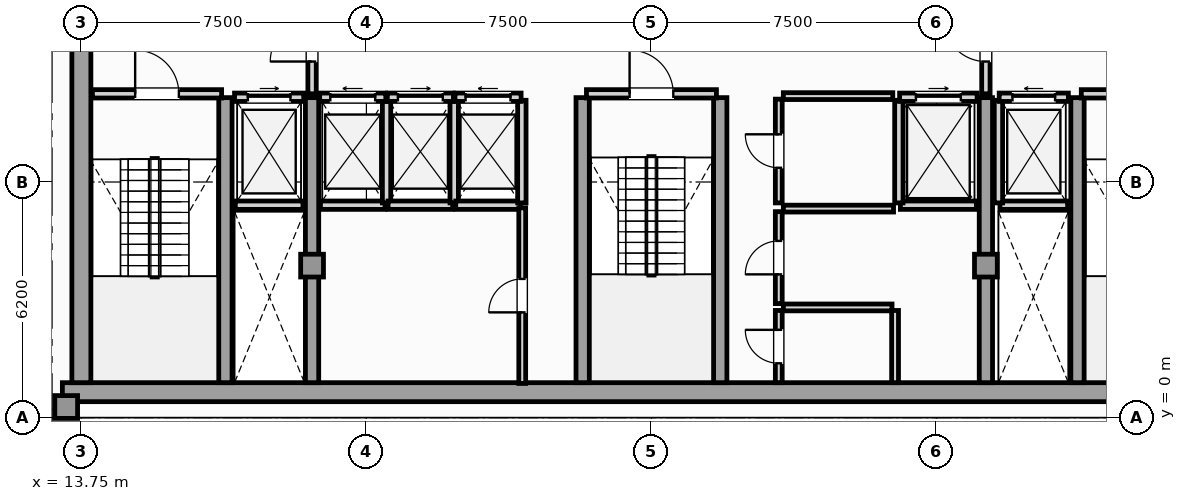
"""IFC4 building model, lengths in metres.
Left out: names, types, materials, properties, quantities, classifications, styles, units other than length and angle.
Written with IfcOpenShell. Run it as: python <this file> out.ifc"""

import sys

from ifc_helpers import new_model, si_unit, direction, frame, frame_2d, origin, origin_2d, place, context, subcontext, project, spatial, rectangle, extrude, element, fill, save


model = new_model("IFC4")
c1 = context("Model", 3, precision=1e-05, world=origin(), true_north=direction((0.0, 1.0)))
c2 = subcontext(c1, "Body", "Model", "MODEL_VIEW")
j1 = project(units=[si_unit("LENGTHUNIT", "METRE"), si_unit("PLANEANGLEUNIT", "RADIAN")], contexts=[c1])
p1 = place(None, origin())
s1 = spatial("IfcSite", under=j1, at=p1, CompositionType="ELEMENT")
p2 = place(p1, origin())
s2 = spatial("IfcBuilding", under=s1, at=p2, CompositionType="ELEMENT")
p3 = place(p2, frame((0.0, 0.0, 349.05)))
s3 = spatial("IfcBuildingStorey", under=s2, at=p3, CompositionType="ELEMENT", Elevation=349.05)
p4 = place(p3, frame((13.25, 0.67, 0.0), z_axis=(0.0, 0.0, 1.0), x_axis=(1.0, 0.0, 0.0)))
e1 = element("IfcWall", 1, at=p4, inside=s3, PredefinedType="SHEAR", context=c2, shape_type="SweptSolid", body=[
    extrude(rectangle(XDim=31.0, YDim=0.5, at=frame_2d((15.5, 0.0))), origin(), (0.0, 0.0, 1.0), 4.14),
])
p5 = place(p3, frame((13.75, 0.92, 0.0), z_axis=(0.0, 0.0, 1.0), x_axis=(0.0, 1.0, 0.0)))
e2 = element("IfcWall", 2, at=p5, inside=s3, PredefinedType="SHEAR", context=c2, shape_type="SweptSolid", body=[
    extrude(rectangle(XDim=10.53, YDim=0.5, at=frame_2d((5.265, 0.0))), origin(), (0.0, 0.0, 1.0), 4.14),
])
for number, where, z_axis, x_axis in (
    (3, (17.54, 0.92, 0.0), (0.0, 0.0, 1.0), (0.0, 1.0, 0.0)),
    (4, (19.82, 0.92, 0.0), (0.0, 0.0, 1.0), (0.0, 1.0, 0.0)),
    (5, (26.94, 0.92, 0.0), (0.0, 0.0, 1.0), (0.0, 1.0, 0.0)),
    (6, (30.56, 0.92, 0.0), (0.0, 0.0, 1.0), (0.0, 1.0, 0.0)),
    (7, (37.55, 0.92, 0.0), (0.0, 0.0, 1.0), (0.0, 1.0, 0.0)),
    (8, (39.96, 0.92, 0.0), (0.0, 0.0, 1.0), (0.0, 1.0, 0.0)),
):
    element("IfcWall", number, at=place(p3, frame(where, z_axis=z_axis, x_axis=x_axis)), inside=s3, PredefinedType="SHEAR", context=c2, shape_type="SweptSolid", body=[
        extrude(rectangle(XDim=7.5, YDim=0.35, at=frame_2d((3.75, 0.0))), origin(), (0.0, 0.0, 1.0), 4.14),
    ])
for number, where, z_axis, x_axis in (
    (9, (13.35, 0.28, 0.0), (0.0, 0.0, 1.0), (1.0, 0.0, 0.0)),
    (10, (19.82, 4.0, 0.0), (0.0, 0.0, 1.0), (1.0, 0.0, 0.0)),
    (11, (37.55, 4.0, 0.0), (0.0, 0.0, 1.0), (1.0, 0.0, 0.0)),
):
    element("IfcColumn", number, at=place(p3, frame(where, z_axis=z_axis, x_axis=x_axis)), inside=s3, PredefinedType="COLUMN", context=c2, shape_type="SweptSolid", body=[
        extrude(rectangle(XDim=0.6, YDim=0.6, at=origin_2d()), origin(), (0.0, 0.0, 1.0), 4.4),
    ])
p6 = place(p3, frame((17.8, 5.59, 0.0), z_axis=(0.0, 0.0, 1.0), x_axis=(1.0, 0.0, 0.0)))
e12 = element("IfcWall", 12, at=p6, inside=s3, PredefinedType="SOLIDWALL", context=c2, shape_type="SweptSolid", body=[
    extrude(rectangle(XDim=1.78, YDim=0.22, at=frame_2d((0.89, 0.0))), origin(), (0.0, 0.0, 1.0), 4.14),
])
p7 = place(p3, frame((17.78, 8.43, 0.0), z_axis=(0.0, 0.0, 1.0), x_axis=(1.0, 0.0, 0.0)))
e13 = element("IfcWall", 13, at=p7, inside=s3, PredefinedType="SOLIDWALL", context=c2, shape_type="SweptSolid", body=[
    extrude(rectangle(XDim=1.82, YDim=0.22, at=frame_2d((0.91, 0.0))), origin(), (0.0, 0.0, 1.0), 4.14),
])
p8 = place(p7, frame((0.35, 0.0, 0.0)))
e14 = element("IfcOpeningElement", 14, at=p8, cuts=e13, PredefinedType="OPENING", context=c2, shape_type="SweptSolid", body=[
    extrude(rectangle(XDim=1.12, YDim=2.25, at=frame_2d((0.56, 1.125))), frame((0.0, 0.12, 0.0), z_axis=(0.0, -1.0, 0.0), x_axis=(1.0, 0.0, 0.0)), (0.0, 0.0, 1.0), 0.24),
])
p9 = place(p3, frame((37.92, 5.59, 0.0), z_axis=(0.0, 0.0, 1.0), x_axis=(1.0, 0.0, 0.0)))
e15 = element("IfcWall", 15, at=p9, inside=s3, PredefinedType="SOLIDWALL", context=c2, shape_type="SweptSolid", body=[
    extrude(rectangle(XDim=1.78, YDim=0.22, at=frame_2d((0.89, 0.0))), origin(), (0.0, 0.0, 1.0), 4.14),
])
p10 = place(p3, frame((37.88, 5.65, 0.0), z_axis=(0.0, 0.0, 1.0), x_axis=(0.0, 1.0, 0.0)))
e16 = element("IfcWall", 16, at=p10, inside=s3, PredefinedType="SOLIDWALL", context=c2, shape_type="SweptSolid", body=[
    extrude(rectangle(XDim=2.7, YDim=0.22, at=frame_2d((1.35, 0.0))), origin(), (0.0, 0.0, 1.0), 4.14),
])
p11 = place(p3, frame((37.9, 8.43, 0.0), z_axis=(0.0, 0.0, 1.0), x_axis=(1.0, 0.0, 0.0)))
e17 = element("IfcWall", 17, at=p11, inside=s3, PredefinedType="SOLIDWALL", context=c2, shape_type="SweptSolid", body=[
    extrude(rectangle(XDim=1.82, YDim=0.22, at=frame_2d((0.91, 0.0))), origin(), (0.0, 0.0, 1.0), 4.14),
])
p12 = place(p11, frame((0.35, 0.0, 0.0)))
e18 = element("IfcOpeningElement", 18, at=p12, cuts=e17, PredefinedType="OPENING", context=c2, shape_type="SweptSolid", body=[
    extrude(rectangle(XDim=1.12, YDim=2.25, at=frame_2d((0.56, 1.125))), frame((0.0, 0.12, 0.0), z_axis=(0.0, -1.0, 0.0), x_axis=(1.0, 0.0, 0.0)), (0.0, 0.0, 1.0), 0.24),
])
p13 = place(p3, frame((35.3, 5.59, 0.0), z_axis=(0.0, 0.0, 1.0), x_axis=(1.0, 0.0, 0.0)))
e19 = element("IfcWall", 19, at=p13, inside=s3, PredefinedType="SOLIDWALL", context=c2, shape_type="SweptSolid", body=[
    extrude(rectangle(XDim=2.0, YDim=0.22, at=frame_2d((1.0, 0.0))), origin(), (0.0, 0.0, 1.0), 4.14),
])
p14 = place(p3, frame((35.26, 5.65, 0.0), z_axis=(0.0, 0.0, 1.0), x_axis=(0.0, 1.0, 0.0)))
e20 = element("IfcWall", 20, at=p14, inside=s3, PredefinedType="SOLIDWALL", context=c2, shape_type="SweptSolid", body=[
    extrude(rectangle(XDim=2.7, YDim=0.22, at=frame_2d((1.35, 0.0))), origin(), (0.0, 0.0, 1.0), 4.14),
])
p15 = place(p3, frame((35.28, 8.43, 0.0), z_axis=(0.0, 0.0, 1.0), x_axis=(1.0, 0.0, 0.0)))
e21 = element("IfcWall", 21, at=p15, inside=s3, PredefinedType="SOLIDWALL", context=c2, shape_type="SweptSolid", body=[
    extrude(rectangle(XDim=2.04, YDim=0.22, at=frame_2d((1.02, 0.0))), origin(), (0.0, 0.0, 1.0), 4.14),
])
p16 = place(p15, frame((0.43, 0.0, 0.0)))
e22 = element("IfcOpeningElement", 22, at=p16, cuts=e21, PredefinedType="OPENING", context=c2, shape_type="SweptSolid", body=[
    extrude(rectangle(XDim=1.18, YDim=2.2, at=frame_2d((0.59, 1.1))), frame((0.0, 0.12, 0.0), z_axis=(0.0, -1.0, 0.0), x_axis=(1.0, 0.0, 0.0)), (0.0, 0.0, 1.0), 0.24),
])
p17 = place(p3, frame((20.04, 5.59, 0.0), z_axis=(0.0, 0.0, 1.0), x_axis=(1.0, 0.0, 0.0)))
e23 = element("IfcWall", 23, at=p17, inside=s3, PredefinedType="SOLIDWALL", context=c2, shape_type="SweptSolid", body=[
    extrude(rectangle(XDim=1.7, YDim=0.22, at=frame_2d((0.85, 0.0))), origin(), (0.0, 0.0, 1.0), 4.14),
])
p18 = place(p3, frame((21.78, 5.65, 0.0), z_axis=(0.0, 0.0, 1.0), x_axis=(0.0, 1.0, 0.0)))
e24 = element("IfcWall", 24, at=p18, inside=s3, PredefinedType="SOLIDWALL", context=c2, shape_type="SweptSolid", body=[
    extrude(rectangle(XDim=2.7, YDim=0.22, at=frame_2d((1.35, 0.0))), origin(), (0.0, 0.0, 1.0), 4.14),
])
p19 = place(p3, frame((20.02, 8.43, 0.0), z_axis=(0.0, 0.0, 1.0), x_axis=(1.0, 0.0, 0.0)))
e25 = element("IfcWall", 25, at=p19, inside=s3, PredefinedType="SOLIDWALL", context=c2, shape_type="SweptSolid", body=[
    extrude(rectangle(XDim=1.74, YDim=0.22, at=frame_2d((0.87, 0.0))), origin(), (0.0, 0.0, 1.0), 4.14),
])
p20 = place(p19, frame((0.28, 0.0, 0.0)))
e26 = element("IfcOpeningElement", 26, at=p20, cuts=e25, PredefinedType="OPENING", context=c2, shape_type="SweptSolid", body=[
    extrude(rectangle(XDim=1.18, YDim=2.2, at=frame_2d((0.59, 1.1))), frame((0.0, 0.12, 0.0), z_axis=(0.0, -1.0, 0.0), x_axis=(1.0, 0.0, 0.0)), (0.0, 0.0, 1.0), 0.24),
])
p21 = place(p3, frame((21.82, 5.59, 0.0), z_axis=(0.0, 0.0, 1.0), x_axis=(1.0, 0.0, 0.0)))
e27 = element("IfcWall", 27, at=p21, inside=s3, PredefinedType="SOLIDWALL", context=c2, shape_type="SweptSolid", body=[
    extrude(rectangle(XDim=1.7, YDim=0.22, at=frame_2d((0.85, 0.0))), origin(), (0.0, 0.0, 1.0), 4.14),
])
p22 = place(p3, frame((23.56, 5.65, 0.0), z_axis=(0.0, 0.0, 1.0), x_axis=(0.0, 1.0, 0.0)))
e28 = element("IfcWall", 28, at=p22, inside=s3, PredefinedType="SOLIDWALL", context=c2, shape_type="SweptSolid", body=[
    extrude(rectangle(XDim=2.7, YDim=0.22, at=frame_2d((1.35, 0.0))), origin(), (0.0, 0.0, 1.0), 4.14),
])
p23 = place(p3, frame((21.8, 8.43, 0.0), z_axis=(0.0, 0.0, 1.0), x_axis=(1.0, 0.0, 0.0)))
e29 = element("IfcWall", 29, at=p23, inside=s3, PredefinedType="SOLIDWALL", context=c2, shape_type="SweptSolid", body=[
    extrude(rectangle(XDim=1.74, YDim=0.22, at=frame_2d((0.87, 0.0))), origin(), (0.0, 0.0, 1.0), 4.14),
])
p24 = place(p23, frame((0.28, 0.0, 0.0)))
e30 = element("IfcOpeningElement", 30, at=p24, cuts=e29, PredefinedType="OPENING", context=c2, shape_type="SweptSolid", body=[
    extrude(rectangle(XDim=1.18, YDim=2.2, at=frame_2d((0.59, 1.1))), frame((0.0, 0.12, 0.0), z_axis=(0.0, -1.0, 0.0), x_axis=(1.0, 0.0, 0.0)), (0.0, 0.0, 1.0), 0.24),
])
p25 = place(p3, frame((23.6, 5.59, 0.0), z_axis=(0.0, 0.0, 1.0), x_axis=(1.0, 0.0, 0.0)))
e31 = element("IfcWall", 31, at=p25, inside=s3, PredefinedType="SOLIDWALL", context=c2, shape_type="SweptSolid", body=[
    extrude(rectangle(XDim=1.7, YDim=0.22, at=frame_2d((0.85, 0.0))), origin(), (0.0, 0.0, 1.0), 4.14),
])
p26 = place(p3, frame((25.34, 5.65, 0.0), z_axis=(0.0, 0.0, 1.0), x_axis=(0.0, 1.0, 0.0)))
e32 = element("IfcWall", 32, at=p26, inside=s3, PredefinedType="SOLIDWALL", context=c2, shape_type="SweptSolid", body=[
    extrude(rectangle(XDim=2.7, YDim=0.22, at=frame_2d((1.35, 0.0))), origin(), (0.0, 0.0, 1.0), 4.14),
])
p27 = place(p3, frame((23.58, 8.43, 0.0), z_axis=(0.0, 0.0, 1.0), x_axis=(1.0, 0.0, 0.0)))
e33 = element("IfcWall", 33, at=p27, inside=s3, PredefinedType="SOLIDWALL", context=c2, shape_type="SweptSolid", body=[
    extrude(rectangle(XDim=1.74, YDim=0.22, at=frame_2d((0.87, 0.0))), origin(), (0.0, 0.0, 1.0), 4.14),
])
p28 = place(p27, frame((0.28, 0.0, 0.0)))
e34 = element("IfcOpeningElement", 34, at=p28, cuts=e33, PredefinedType="OPENING", context=c2, shape_type="SweptSolid", body=[
    extrude(rectangle(XDim=1.18, YDim=2.2, at=frame_2d((0.59, 1.1))), frame((0.0, 0.12, 0.0), z_axis=(0.0, -1.0, 0.0), x_axis=(1.0, 0.0, 0.0)), (0.0, 0.0, 1.0), 0.24),
])
p29 = place(p3, frame((14.04, 8.52, 0.0), z_axis=(0.0, 0.0, 1.0), x_axis=(1.0, 0.0, 0.0)))
e35 = element("IfcWall", 35, at=p29, inside=s3, PredefinedType="SOLIDWALL", context=c2, shape_type="SweptSolid", body=[
    extrude(rectangle(XDim=3.4, YDim=0.22, at=frame_2d((1.7, 0.0))), origin(), (0.0, 0.0, 1.0), 4.14),
])
p30 = place(p29, frame((1.125, 0.0, 0.0)))
e36 = element("IfcOpeningElement", 36, at=p30, cuts=e35, PredefinedType="OPENING", context=c2, shape_type="SweptSolid", body=[
    extrude(rectangle(XDim=1.15, YDim=2.2, at=frame_2d((0.575, 1.1))), frame((0.0, 0.12, 0.0), z_axis=(0.0, -1.0, 0.0), x_axis=(1.0, 0.0, 0.0)), (0.0, 0.0, 1.0), 0.24),
])
p31 = place(p3, frame((40.06, 8.52, 0.0), z_axis=(0.0, 0.0, 1.0), x_axis=(1.0, 0.0, 0.0)))
e37 = element("IfcWall", 37, at=p31, inside=s3, PredefinedType="SOLIDWALL", context=c2, shape_type="SweptSolid", body=[
    extrude(rectangle(XDim=3.4, YDim=0.22, at=frame_2d((1.7, 0.0))), origin(), (0.0, 0.0, 1.0), 4.14),
])
p32 = place(p31, frame((1.125, 0.0, 0.0)))
e38 = element("IfcOpeningElement", 38, at=p32, cuts=e37, PredefinedType="OPENING", context=c2, shape_type="SweptSolid", body=[
    extrude(rectangle(XDim=1.15, YDim=2.2, at=frame_2d((0.575, 1.1))), frame((0.0, 0.12, 0.0), z_axis=(0.0, -1.0, 0.0), x_axis=(1.0, 0.0, 0.0)), (0.0, 0.0, 1.0), 0.24),
])
p33 = place(p3, frame((27.04, 8.52, 0.0), z_axis=(0.0, 0.0, 1.0), x_axis=(1.0, 0.0, 0.0)))
e39 = element("IfcWall", 39, at=p33, inside=s3, PredefinedType="SOLIDWALL", context=c2, shape_type="SweptSolid", body=[
    extrude(rectangle(XDim=3.42, YDim=0.22, at=frame_2d((1.71, 0.0))), origin(), (0.0, 0.0, 1.0), 4.14),
])
p34 = place(p33, frame((1.135, 0.0, 0.0)))
e40 = element("IfcOpeningElement", 40, at=p34, cuts=e39, PredefinedType="OPENING", context=c2, shape_type="SweptSolid", body=[
    extrude(rectangle(XDim=1.15, YDim=2.2, at=frame_2d((0.575, 1.1))), frame((0.0, 0.12, 0.0), z_axis=(0.0, -1.0, 0.0), x_axis=(1.0, 0.0, 0.0)), (0.0, 0.0, 1.0), 0.24),
])
p35 = place(p3, frame((19.82, 8.52, 0.0), z_axis=(0.0, 0.0, 1.0), x_axis=(0.0, 1.0, 0.0)))
e41 = element("IfcWall", 41, at=p35, inside=s3, PredefinedType="SOLIDWALL", context=c2, shape_type="SweptSolid", body=[
    extrude(rectangle(XDim=2.8, YDim=0.22, at=frame_2d((1.4, 0.0))), origin(), (0.0, 0.0, 1.0), 3.595),
])
p36 = place(p35, frame((0.85, 0.0, 0.0)))
e42 = element("IfcOpeningElement", 42, at=p36, cuts=e41, PredefinedType="OPENING", context=c2, shape_type="SweptSolid", body=[
    extrude(rectangle(XDim=1.1, YDim=2.2, at=frame_2d((0.55, 1.1))), frame((0.0, 0.12, 0.0), z_axis=(0.0, -1.0, 0.0), x_axis=(1.0, 0.0, 0.0)), (0.0, 0.0, 1.0), 0.24),
])
p37 = place(p3, frame((37.55, 8.52, 0.0), z_axis=(0.0, 0.0, 1.0), x_axis=(0.0, 1.0, 0.0)))
e43 = element("IfcWall", 43, at=p37, inside=s3, PredefinedType="SOLIDWALL", context=c2, shape_type="SweptSolid", body=[
    extrude(rectangle(XDim=2.8, YDim=0.22, at=frame_2d((1.4, 0.0))), origin(), (0.0, 0.0, 1.0), 3.595),
])
p38 = place(p37, frame((0.85, 0.0, 0.0)))
e44 = element("IfcOpeningElement", 44, at=p38, cuts=e43, PredefinedType="OPENING", context=c2, shape_type="SweptSolid", body=[
    extrude(rectangle(XDim=1.1, YDim=2.2, at=frame_2d((0.55, 1.1))), frame((0.0, 0.12, 0.0), z_axis=(0.0, -1.0, 0.0), x_axis=(1.0, 0.0, 0.0)), (0.0, 0.0, 1.0), 0.24),
])
p39 = place(p3, frame((25.35, 0.9, 0.0), z_axis=(0.0, 0.0, 1.0), x_axis=(0.0, 1.0, 0.0)))
e45 = element("IfcWall", 45, at=p39, inside=s3, PredefinedType="PARTITIONING", context=c2, shape_type="SweptSolid", body=[
    extrude(rectangle(XDim=4.62, YDim=0.18, at=frame_2d((2.31, 0.0))), origin(), (0.0, 0.0, 1.0), 4.14),
])
p40 = place(p39, frame((1.87, 0.0, 0.0)))
e46 = element("IfcOpeningElement", 46, at=p40, cuts=e45, PredefinedType="OPENING", context=c2, shape_type="SweptSolid", body=[
    extrude(rectangle(XDim=0.88, YDim=2.05, at=frame_2d((0.44, 1.025))), frame((0.0, 0.1, 0.0), z_axis=(0.0, -1.0, 0.0), x_axis=(1.0, 0.0, 0.0)), (0.0, 0.0, 1.0), 0.2),
])
p41 = place(p3, frame((32.1, 0.92, 0.0), z_axis=(0.0, 0.0, 1.0), x_axis=(0.0, 1.0, 0.0)))
e47 = element("IfcWall", 47, at=p41, inside=s3, PredefinedType="PARTITIONING", context=c2, shape_type="SweptSolid", body=[
    extrude(rectangle(XDim=1.9, YDim=0.18, at=frame_2d((0.95, 0.0))), origin(), (0.0, 0.0, 1.0), 4.14),
])
p42 = place(p41, frame((0.51, 0.0, 0.0)))
e48 = element("IfcOpeningElement", 48, at=p42, cuts=e47, PredefinedType="OPENING", context=c2, shape_type="SweptSolid", body=[
    extrude(rectangle(XDim=0.88, YDim=2.05, at=frame_2d((0.44, 1.025))), frame((0.0, 0.1, 0.0), z_axis=(0.0, -1.0, 0.0), x_axis=(1.0, 0.0, 0.0)), (0.0, 0.0, 1.0), 0.2),
])
p43 = place(p3, frame((32.22, 2.9, 0.0), z_axis=(0.0, 0.0, 1.0), x_axis=(1.0, 0.0, 0.0)))
e49 = element("IfcWall", 49, at=p43, inside=s3, PredefinedType="PARTITIONING", context=c2, shape_type="SweptSolid", body=[
    extrude(rectangle(XDim=2.86, YDim=0.18, at=frame_2d((1.43, 0.0))), origin(), (0.0, 0.0, 1.0), 4.14),
])
p44 = place(p3, frame((35.16, 0.92, 0.0), z_axis=(0.0, 0.0, 1.0), x_axis=(0.0, 1.0, 0.0)))
e50 = element("IfcWall", 50, at=p44, inside=s3, PredefinedType="PARTITIONING", context=c2, shape_type="SweptSolid", body=[
    extrude(rectangle(XDim=1.9, YDim=0.18, at=frame_2d((0.95, 0.0))), origin(), (0.0, 0.0, 1.0), 4.14),
])
p45 = place(p3, frame((32.1, 3.0, 0.0), z_axis=(0.0, 0.0, 1.0), x_axis=(0.0, 1.0, 0.0)))
e51 = element("IfcWall", 51, at=p45, inside=s3, PredefinedType="PARTITIONING", context=c2, shape_type="SweptSolid", body=[
    extrude(rectangle(XDim=2.42, YDim=0.18, at=frame_2d((1.21, 0.0))), origin(), (0.0, 0.0, 1.0), 4.14),
])
p46 = place(p45, frame((0.77, 0.0, 0.0)))
e52 = element("IfcOpeningElement", 52, at=p46, cuts=e51, PredefinedType="OPENING", context=c2, shape_type="SweptSolid", body=[
    extrude(rectangle(XDim=0.88, YDim=2.05, at=frame_2d((0.44, 1.025))), frame((0.0, 0.1, 0.0), z_axis=(0.0, -1.0, 0.0), x_axis=(1.0, 0.0, 0.0)), (0.0, 0.0, 1.0), 0.2),
])
p47 = place(p3, frame((32.22, 5.5, 0.0), z_axis=(0.0, 0.0, 1.0), x_axis=(1.0, 0.0, 0.0)))
e53 = element("IfcWall", 53, at=p47, inside=s3, PredefinedType="PARTITIONING", context=c2, shape_type="SweptSolid", body=[
    extrude(rectangle(XDim=2.9, YDim=0.18, at=frame_2d((1.45, 0.0))), origin(), (0.0, 0.0, 1.0), 4.14),
])
p48 = place(p3, frame((32.1, 5.65, 0.0), z_axis=(0.0, 0.0, 1.0), x_axis=(0.0, 1.0, 0.0)))
e54 = element("IfcWall", 54, at=p48, inside=s3, PredefinedType="PARTITIONING", context=c2, shape_type="SweptSolid", body=[
    extrude(rectangle(XDim=2.73, YDim=0.18, at=frame_2d((1.365, 0.0))), origin(), (0.0, 0.0, 1.0), 4.14),
])
p49 = place(p48, frame((0.925, 0.0, 0.0)))
e55 = element("IfcOpeningElement", 55, at=p49, cuts=e54, PredefinedType="OPENING", context=c2, shape_type="SweptSolid", body=[
    extrude(rectangle(XDim=0.88, YDim=2.05, at=frame_2d((0.44, 1.025))), frame((0.0, 0.1, 0.0), z_axis=(0.0, -1.0, 0.0), x_axis=(1.0, 0.0, 0.0)), (0.0, 0.0, 1.0), 0.2),
])
p50 = place(p3, frame((32.22, 8.46, 0.0), z_axis=(0.0, 0.0, 1.0), x_axis=(1.0, 0.0, 0.0)))
e56 = element("IfcWall", 56, at=p50, inside=s3, PredefinedType="PARTITIONING", context=c2, shape_type="SweptSolid", body=[
    extrude(rectangle(XDim=2.88, YDim=0.18, at=frame_2d((1.44, 0.0))), origin(), (0.0, 0.0, 1.0), 4.14),
])
p51 = place(p8, origin())
e57 = element("IfcDoor", 57, at=p51, inside=s3, OperationType="SLIDING_TO_RIGHT", PredefinedType="DOOR", context=c2, shape_type="SweptSolid", body=[
    extrude(rectangle(XDim=1.12, YDim=2.25, at=frame_2d((0.56, 1.125))), frame((0.0, 0.025, 0.0), z_axis=(0.0, -1.0, 0.0), x_axis=(1.0, 0.0, 0.0)), (0.0, 0.0, 1.0), 0.05),
])
fill(e14, e57)
p52 = place(p12, origin())
e58 = element("IfcDoor", 58, at=p52, inside=s3, OperationType="SLIDING_TO_LEFT", PredefinedType="DOOR", context=c2, shape_type="SweptSolid", body=[
    extrude(rectangle(XDim=1.12, YDim=2.25, at=frame_2d((0.56, 1.125))), frame((0.0, 0.025, 0.0), z_axis=(0.0, -1.0, 0.0), x_axis=(1.0, 0.0, 0.0)), (0.0, 0.0, 1.0), 0.05),
])
fill(e18, e58)
p53 = place(p16, origin())
e59 = element("IfcDoor", 59, at=p53, inside=s3, OperationType="SLIDING_TO_RIGHT", PredefinedType="DOOR", context=c2, shape_type="SweptSolid", body=[
    extrude(rectangle(XDim=1.18, YDim=2.2, at=frame_2d((0.59, 1.1))), frame((0.0, 0.025, 0.0), z_axis=(0.0, -1.0, 0.0), x_axis=(1.0, 0.0, 0.0)), (0.0, 0.0, 1.0), 0.05),
])
fill(e22, e59)
p54 = place(p20, origin())
e60 = element("IfcDoor", 60, at=p54, inside=s3, OperationType="SLIDING_TO_LEFT", PredefinedType="DOOR", context=c2, shape_type="SweptSolid", body=[
    extrude(rectangle(XDim=1.18, YDim=2.2, at=frame_2d((0.59, 1.1))), frame((0.0, 0.025, 0.0), z_axis=(0.0, -1.0, 0.0), x_axis=(1.0, 0.0, 0.0)), (0.0, 0.0, 1.0), 0.05),
])
fill(e26, e60)
p55 = place(p24, origin())
e61 = element("IfcDoor", 61, at=p55, inside=s3, OperationType="SLIDING_TO_RIGHT", PredefinedType="DOOR", context=c2, shape_type="SweptSolid", body=[
    extrude(rectangle(XDim=1.18, YDim=2.2, at=frame_2d((0.59, 1.1))), frame((0.0, 0.025, 0.0), z_axis=(0.0, -1.0, 0.0), x_axis=(1.0, 0.0, 0.0)), (0.0, 0.0, 1.0), 0.05),
])
fill(e30, e61)
p56 = place(p28, origin())
e62 = element("IfcDoor", 62, at=p56, inside=s3, OperationType="SLIDING_TO_LEFT", PredefinedType="DOOR", context=c2, shape_type="SweptSolid", body=[
    extrude(rectangle(XDim=1.18, YDim=2.2, at=frame_2d((0.59, 1.1))), frame((0.0, 0.025, 0.0), z_axis=(0.0, -1.0, 0.0), x_axis=(1.0, 0.0, 0.0)), (0.0, 0.0, 1.0), 0.05),
])
fill(e34, e62)
p57 = place(p30, origin())
e63 = element("IfcDoor", 63, at=p57, inside=s3, OperationType="SINGLE_SWING_LEFT", PredefinedType="DOOR", context=c2, shape_type="SweptSolid", body=[
    extrude(rectangle(XDim=1.15, YDim=2.2, at=frame_2d((0.575, 1.1))), frame((0.0, 0.025, 0.0), z_axis=(0.0, -1.0, 0.0), x_axis=(1.0, 0.0, 0.0)), (0.0, 0.0, 1.0), 0.05),
])
fill(e36, e63)
p58 = place(p34, origin())
e64 = element("IfcDoor", 64, at=p58, inside=s3, OperationType="SINGLE_SWING_LEFT", PredefinedType="DOOR", context=c2, shape_type="SweptSolid", body=[
    extrude(rectangle(XDim=1.15, YDim=2.2, at=frame_2d((0.575, 1.1))), frame((0.0, 0.025, 0.0), z_axis=(0.0, -1.0, 0.0), x_axis=(1.0, 0.0, 0.0)), (0.0, 0.0, 1.0), 0.05),
])
fill(e40, e64)
p59 = place(p36, origin())
e65 = element("IfcDoor", 65, at=p59, inside=s3, OperationType="SINGLE_SWING_LEFT", PredefinedType="DOOR", context=c2, shape_type="SweptSolid", body=[
    extrude(rectangle(XDim=1.1, YDim=2.2, at=frame_2d((0.55, 1.1))), frame((0.0, 0.025, 0.0), z_axis=(0.0, -1.0, 0.0), x_axis=(1.0, 0.0, 0.0)), (0.0, 0.0, 1.0), 0.05),
])
fill(e42, e65)
p60 = place(p38, origin())
e66 = element("IfcDoor", 66, at=p60, inside=s3, OperationType="SINGLE_SWING_RIGHT", PredefinedType="DOOR", context=c2, shape_type="SweptSolid", body=[
    extrude(rectangle(XDim=1.1, YDim=2.2, at=frame_2d((0.55, 1.1))), frame((0.0, 0.025, 0.0), z_axis=(0.0, -1.0, 0.0), x_axis=(1.0, 0.0, 0.0)), (0.0, 0.0, 1.0), 0.05),
])
fill(e44, e66)
p61 = place(p40, origin())
e67 = element("IfcDoor", 67, at=p61, inside=s3, OperationType="SINGLE_SWING_LEFT", PredefinedType="DOOR", context=c2, shape_type="SweptSolid", body=[
    extrude(rectangle(XDim=0.88, YDim=2.05, at=frame_2d((0.44, 1.025))), frame((0.0, 0.025, 0.0), z_axis=(0.0, -1.0, 0.0), x_axis=(1.0, 0.0, 0.0)), (0.0, 0.0, 1.0), 0.05),
])
fill(e46, e67)
p62 = place(p42, origin())
e68 = element("IfcDoor", 68, at=p62, inside=s3, OperationType="SINGLE_SWING_RIGHT", PredefinedType="DOOR", context=c2, shape_type="SweptSolid", body=[
    extrude(rectangle(XDim=0.88, YDim=2.05, at=frame_2d((0.44, 1.025))), frame((0.0, 0.025, 0.0), z_axis=(0.0, -1.0, 0.0), x_axis=(1.0, 0.0, 0.0)), (0.0, 0.0, 1.0), 0.05),
])
fill(e48, e68)
p63 = place(p46, origin())
e69 = element("IfcDoor", 69, at=p63, inside=s3, OperationType="SINGLE_SWING_LEFT", PredefinedType="DOOR", context=c2, shape_type="SweptSolid", body=[
    extrude(rectangle(XDim=0.88, YDim=2.05, at=frame_2d((0.44, 1.025))), frame((0.0, 0.025, 0.0), z_axis=(0.0, -1.0, 0.0), x_axis=(1.0, 0.0, 0.0)), (0.0, 0.0, 1.0), 0.05),
])
fill(e52, e69)
p64 = place(p49, origin())
e70 = element("IfcDoor", 70, at=p64, inside=s3, OperationType="SINGLE_SWING_RIGHT", PredefinedType="DOOR", context=c2, shape_type="SweptSolid", body=[
    extrude(rectangle(XDim=0.88, YDim=2.05, at=frame_2d((0.44, 1.025))), frame((0.0, 0.025, 0.0), z_axis=(0.0, -1.0, 0.0), x_axis=(1.0, 0.0, 0.0)), (0.0, 0.0, 1.0), 0.05),
])
fill(e55, e70)
save(model, sys.argv[1])
